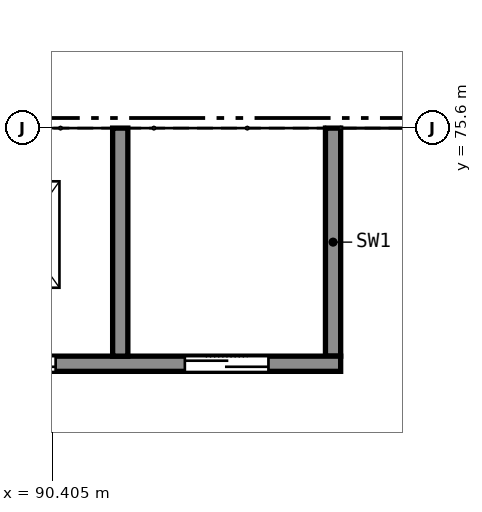
"""IFC4 building model, lengths in metres.
Left out: names, types, materials, properties, quantities, classifications, styles, units other than length and angle.
Written with IfcOpenShell. Run it as: python <this file> out.ifc"""

import sys

from ifc_helpers import new_model, si_unit, direction, frame, frame_2d, origin, origin_2d, place, context, subcontext, project, spatial, rectangle, extrude, element, fill, save


model = new_model("IFC4")
c1 = context("Model", 3, precision=1e-05, world=origin(), true_north=direction((0.0, 1.0)))
c2 = subcontext(c1, "Body", "Model", "MODEL_VIEW")
j1 = project(units=[si_unit("LENGTHUNIT", "METRE"), si_unit("PLANEANGLEUNIT", "RADIAN")], contexts=[c1])
p1 = place(None, origin())
s1 = spatial("IfcSite", under=j1, at=p1, CompositionType="ELEMENT")
p2 = place(p1, origin())
s2 = spatial("IfcBuilding", under=s1, at=p2, CompositionType="ELEMENT")
p3 = place(p2, frame((0.0, 0.0, 30.0)))
s3 = spatial("IfcBuildingStorey", under=s2, at=p3, CompositionType="ELEMENT", Elevation=30.0)
p4 = place(p3, frame((85.6, 72.5, 0.0), z_axis=(0.0, 0.0, 1.0), x_axis=(1.0, 0.0, 0.0)))
e1 = element("IfcWall", 1, at=p4, inside=s3, PredefinedType="SHEAR", context=c2, shape_type="SweptSolid", body=[
    extrude(rectangle(XDim=8.6, YDim=0.2, at=frame_2d((4.3, 0.0))), origin(), (0.0, 0.0, 1.0), 5.0),
])
p5 = place(p4, frame((0.95, 0.0, 0.0)))
e2 = element("IfcOpeningElement", 2, at=p5, cuts=e1, PredefinedType="OPENING", context=c2, shape_type="SweptSolid", body=[
    extrude(rectangle(XDim=1.1, YDim=2.1, at=frame_2d((0.55, 1.05))), frame((0.0, 0.11, 0.0), z_axis=(0.0, -1.0, 0.0), x_axis=(1.0, 0.0, 0.0)), (0.0, 0.0, 1.0), 0.22),
])
p6 = place(p4, frame((3.75, 0.0, 0.0)))
e3 = element("IfcOpeningElement", 3, at=p6, cuts=e1, PredefinedType="OPENING", context=c2, shape_type="SweptSolid", body=[
    extrude(rectangle(XDim=1.1, YDim=2.1, at=frame_2d((0.55, 1.05))), frame((0.0, 0.11, 0.0), z_axis=(0.0, -1.0, 0.0), x_axis=(1.0, 0.0, 0.0)), (0.0, 0.0, 1.0), 0.22),
])
p7 = place(p4, frame((6.55, 0.0, 0.0)))
e4 = element("IfcOpeningElement", 4, at=p7, cuts=e1, PredefinedType="OPENING", context=c2, shape_type="SweptSolid", body=[
    extrude(rectangle(XDim=1.1, YDim=2.1, at=frame_2d((0.55, 1.05))), frame((0.0, 0.11, 0.0), z_axis=(0.0, -1.0, 0.0), x_axis=(1.0, 0.0, 0.0)), (0.0, 0.0, 1.0), 0.22),
])
for number, where, z_axis, x_axis in (
    (5, (94.1, 72.6, 0.0), (0.0, 0.0, 1.0), (0.0, 1.0, 0.0)),
    (6, (91.3, 72.6, 0.0), (0.0, 0.0, 1.0), (0.0, 1.0, 0.0)),
):
    element("IfcWall", number, at=place(p3, frame(where, z_axis=z_axis, x_axis=x_axis)), inside=s3, PredefinedType="SHEAR", context=c2, shape_type="SweptSolid", body=[
        extrude(rectangle(XDim=3.0, YDim=0.2, at=frame_2d((1.5, 0.0))), origin(), (0.0, 0.0, 1.0), 5.0),
    ])
p8 = place(p3, frame((73.2, 67.2, 5.0), z_axis=(5.49644e-07, -0.292373342907, 0.956304255118), x_axis=(-1e-12, 0.956304255118, 0.292373342907)))
p9 = place(p8, frame((7.32, -16.8, 0.01), z_axis=(0.0, 0.0, -1.0), x_axis=(1.797794e-06, -0.999999999998, 0.0)))
p10 = place(p9, frame((0.0, 0.0, 0.01)))
e7 = element("IfcWindow", 7, at=p10, inside=s3, PartitioningType="SINGLE_PANEL", PredefinedType="SKYLIGHT", context=c2, shape_type="SweptSolid", body=[
    extrude(rectangle(XDim=1.0, YDim=1.4, at=origin_2d()), origin(), (0.0, 0.0, 1.0), 0.05),
])
p11 = place(p6, origin())
e8 = element("IfcDoor", 8, at=p11, inside=s3, OperationType="DOUBLE_DOOR_SLIDING", PredefinedType="DOOR", context=c2, shape_type="SweptSolid", body=[
    extrude(rectangle(XDim=1.1, YDim=2.1, at=frame_2d((0.55, 1.05))), frame((0.0, 0.025, 0.0), z_axis=(0.0, -1.0, 0.0), x_axis=(1.0, 0.0, 0.0)), (0.0, 0.0, 1.0), 0.05),
])
fill(e3, e8)
p12 = place(p7, origin())
e9 = element("IfcDoor", 9, at=p12, inside=s3, OperationType="DOUBLE_DOOR_SLIDING", PredefinedType="DOOR", context=c2, shape_type="SweptSolid", body=[
    extrude(rectangle(XDim=1.1, YDim=2.1, at=frame_2d((0.55, 1.05))), frame((0.0, 0.025, 0.0), z_axis=(0.0, -1.0, 0.0), x_axis=(1.0, 0.0, 0.0)), (0.0, 0.0, 1.0), 0.05),
])
fill(e4, e9)
save(model, sys.argv[1])
